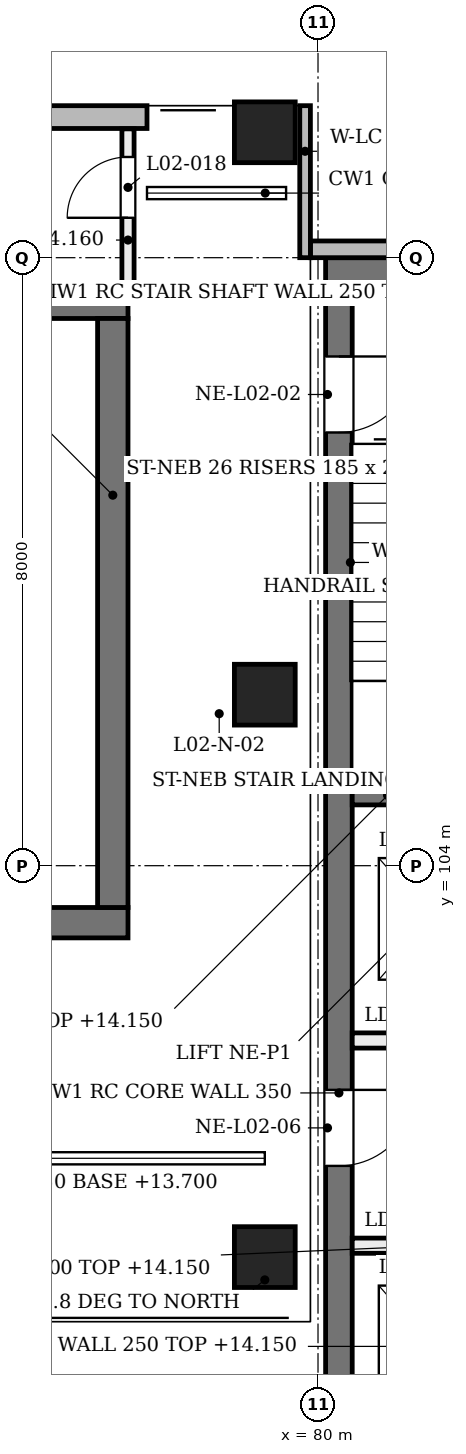
"""IFC4 building model, lengths in metres.
Left out: names, types, materials, properties, quantities, classifications, styles, units other than length and angle.
Written with IfcOpenShell. Run it as: python <this file> out.ifc"""

import sys

from ifc_helpers import new_model, si_unit, direction, frame, frame_2d, origin, origin_2d, place, context, subcontext, project, spatial, rectangle, extrude, element, fill, save


model = new_model("IFC4")
c1 = context("Model", 3, precision=1e-05, world=origin(), true_north=direction((0.0, 1.0)))
c2 = subcontext(c1, "Body", "Model", "MODEL_VIEW")
j1 = project(units=[si_unit("LENGTHUNIT", "METRE"), si_unit("PLANEANGLEUNIT", "RADIAN")], contexts=[c1])
p1 = place(None, origin())
s1 = spatial("IfcSite", under=j1, at=p1, CompositionType="ELEMENT")
p2 = place(p1, origin())
s2 = spatial("IfcBuilding", under=s1, at=p2, CompositionType="ELEMENT")
p3 = place(p2, frame((0.0, 0.0, 9.6)))
s3 = spatial("IfcBuildingStorey", under=s2, at=p3, CompositionType="ELEMENT", Elevation=9.6)
p4 = place(p3, frame((68.0, 103.25, 0.0), z_axis=(0.0, 0.0, 1.0), x_axis=(1.0, 0.0, 0.0)))
e1 = element("IfcWall", 1, at=p4, inside=s3, PredefinedType="SHEAR", context=c2, shape_type="SweptSolid", body=[
    extrude(rectangle(XDim=9.5, YDim=0.4, at=frame_2d((4.75, 0.0))), origin(), (0.0, 0.0, 1.0), 4.58),
])
p5 = place(p4, frame((1.25, 0.0, 0.0)))
e2 = element("IfcOpeningElement", 2, at=p5, cuts=e1, PredefinedType="OPENING", context=c2, shape_type="SweptSolid", body=[
    extrude(rectangle(XDim=1.05, YDim=2.2, at=frame_2d((0.525, 1.1))), frame((0.0, 0.21, 0.0), z_axis=(0.0, -1.0, 0.0), x_axis=(1.0, 0.0, 0.0)), (0.0, 0.0, 1.0), 0.42),
])
p6 = place(p4, frame((4.15, 0.0, 0.0)))
e3 = element("IfcOpeningElement", 3, at=p6, cuts=e1, PredefinedType="OPENING", context=c2, shape_type="SweptSolid", body=[
    extrude(rectangle(XDim=1.05, YDim=2.2, at=frame_2d((0.525, 1.1))), frame((0.0, 0.21, 0.0), z_axis=(0.0, -1.0, 0.0), x_axis=(1.0, 0.0, 0.0)), (0.0, 0.0, 1.0), 0.42),
])
p7 = place(p4, frame((7.05, 0.0, 0.0)))
e4 = element("IfcOpeningElement", 4, at=p7, cuts=e1, PredefinedType="OPENING", context=c2, shape_type="SweptSolid", body=[
    extrude(rectangle(XDim=1.05, YDim=2.2, at=frame_2d((0.525, 1.1))), frame((0.0, 0.21, 0.0), z_axis=(0.0, -1.0, 0.0), x_axis=(1.0, 0.0, 0.0)), (0.0, 0.0, 1.0), 0.42),
])
p8 = place(p3, frame((68.0, 111.4, 0.0), z_axis=(0.0, 0.0, 1.0), x_axis=(1.0, 0.0, 0.0)))
e5 = element("IfcWall", 5, at=p8, inside=s3, PredefinedType="SHEAR", context=c2, shape_type="SweptSolid", body=[
    extrude(rectangle(XDim=9.5, YDim=0.4, at=frame_2d((4.75, 0.0))), origin(), (0.0, 0.0, 1.0), 4.58),
])
p9 = place(p3, frame((77.3, 103.45, 0.0), z_axis=(0.0, 0.0, 1.0), x_axis=(0.0, 1.0, 0.0)))
e6 = element("IfcWall", 6, at=p9, inside=s3, PredefinedType="SHEAR", context=c2, shape_type="SweptSolid", body=[
    extrude(rectangle(XDim=7.75, YDim=0.4, at=frame_2d((3.875, 0.0))), origin(), (0.0, 0.0, 1.0), 4.58),
])
p10 = place(p3, frame((80.1, 111.825, 0.0), z_axis=(0.0, 0.0, 1.0), x_axis=(1.0, 0.0, 0.0)))
e7 = element("IfcWall", 7, at=p10, inside=s3, PredefinedType="SHEAR", context=c2, shape_type="SweptSolid", body=[
    extrude(rectangle(XDim=7.9, YDim=0.35, at=frame_2d((3.95, 0.0))), origin(), (0.0, 0.0, 1.0), 4.58),
])
p11 = place(p3, frame((80.275, 96.45, 0.0), z_axis=(0.0, 0.0, 1.0), x_axis=(0.0, 1.0, 0.0)))
e8 = element("IfcWall", 8, at=p11, inside=s3, PredefinedType="SHEAR", context=c2, shape_type="SweptSolid", body=[
    extrude(rectangle(XDim=15.2, YDim=0.35, at=frame_2d((7.6, 0.0))), origin(), (0.0, 0.0, 1.0), 4.58),
])
p12 = place(p11, frame((13.25, 0.0, 0.0)))
e9 = element("IfcOpeningElement", 9, at=p12, cuts=e8, PredefinedType="OPENING", context=c2, shape_type="SweptSolid", body=[
    extrude(rectangle(XDim=1.0, YDim=2.1, at=frame_2d((0.5, 1.05))), frame((0.0, 0.185, 0.0), z_axis=(0.0, -1.0, 0.0), x_axis=(1.0, 0.0, 0.0)), (0.0, 0.0, 1.0), 0.37),
])
p13 = place(p11, frame((3.6, 0.0, 0.0)))
e10 = element("IfcOpeningElement", 10, at=p13, cuts=e8, PredefinedType="OPENING", context=c2, shape_type="SweptSolid", body=[
    extrude(rectangle(XDim=1.0, YDim=2.1, at=frame_2d((0.5, 1.05))), frame((0.0, 0.185, 0.0), z_axis=(0.0, -1.0, 0.0), x_axis=(1.0, 0.0, 0.0)), (0.0, 0.0, 1.0), 0.37),
])
for number, where, z_axis, x_axis in (
    (11, (79.3, 98.6, 0.0), (0.0, 0.204, 0.979), (-1.0, 0.0, 0.0)),
    (12, (79.3, 106.0, 0.0), (0.0, 0.204, 0.979), (-1.0, 0.0, 0.0)),
    (13, (79.3, 113.4, 0.0), (0.0, 0.204, 0.979), (-1.0, 0.0, 0.0)),
):
    element("IfcColumn", number, at=place(p3, frame(where, z_axis=z_axis, x_axis=x_axis)), inside=s3, PredefinedType="COLUMN", context=c2, shape_type="SweptSolid", body=[
        extrude(rectangle(XDim=0.8, YDim=0.8, at=origin_2d()), origin(), (0.0, 0.0, 1.0), 4.903),
    ])
p14 = place(p3, frame((26.25, 113.85, 0.0), z_axis=(0.0, 0.0, 1.0), x_axis=(1.0, 0.0, 0.0)))
e14 = element("IfcWall", 14, at=p14, inside=s3, PredefinedType="SOLIDWALL", context=c2, shape_type="SweptSolid", body=[
    extrude(rectangle(XDim=51.5, YDim=0.3, at=frame_2d((25.75, 0.0))), origin(), (0.0, 0.0, 1.0), 3.9),
])
p15 = place(p3, frame((72.2, 100.15, 4.1), z_axis=(0.0, 0.0, 1.0), x_axis=(1.0, 0.0, 0.0)))
e15 = element("IfcWall", 15, at=p15, inside=s3, PredefinedType="SOLIDWALL", context=c2, shape_type="SweptSolid", body=[
    extrude(rectangle(XDim=6.9, YDim=0.15, at=frame_2d((3.45, 0.0))), origin(), (0.0, 0.0, 1.0), 0.48),
])
p16 = place(p3, frame((79.9, 112.11, 0.0), z_axis=(0.0, 0.0, 1.0), x_axis=(1.0, 0.0, 0.0)))
e16 = element("IfcWall", 16, at=p16, inside=s3, PredefinedType="SOLIDWALL", context=c2, shape_type="SweptSolid", body=[
    extrude(rectangle(XDim=8.2, YDim=0.22, at=frame_2d((4.1, 0.0))), origin(), (0.0, 0.0, 1.0), 3.9),
])
p17 = place(p16, frame((1.308, 0.0, 0.9)))
e17 = element("IfcOpeningElement", 17, at=p17, cuts=e16, PredefinedType="OPENING", context=c2, shape_type="SweptSolid", body=[
    extrude(rectangle(XDim=0.45, YDim=2.6, at=frame_2d((0.225, 1.3))), frame((0.0, 0.12, 0.0), z_axis=(0.0, -1.0, 0.0), x_axis=(1.0, 0.0, 0.0)), (0.0, 0.0, 1.0), 0.24),
])
p18 = place(p16, frame((3.975, 0.0, 0.9)))
e18 = element("IfcOpeningElement", 18, at=p18, cuts=e16, PredefinedType="OPENING", context=c2, shape_type="SweptSolid", body=[
    extrude(rectangle(XDim=0.45, YDim=2.6, at=frame_2d((0.225, 1.3))), frame((0.0, 0.12, 0.0), z_axis=(0.0, -1.0, 0.0), x_axis=(1.0, 0.0, 0.0)), (0.0, 0.0, 1.0), 0.24),
])
p19 = place(p16, frame((6.642, 0.0, 0.9)))
e19 = element("IfcOpeningElement", 19, at=p19, cuts=e16, PredefinedType="OPENING", context=c2, shape_type="SweptSolid", body=[
    extrude(rectangle(XDim=0.45, YDim=2.6, at=frame_2d((0.225, 1.3))), frame((0.0, 0.12, 0.0), z_axis=(0.0, -1.0, 0.0), x_axis=(1.0, 0.0, 0.0)), (0.0, 0.0, 1.0), 0.24),
])
p20 = place(p3, frame((79.83, 112.0, 0.0), z_axis=(0.0, 0.0, 1.0), x_axis=(0.0, 1.0, 0.0)))
e20 = element("IfcWall", 20, at=p20, inside=s3, PredefinedType="SOLIDWALL", context=c2, shape_type="SweptSolid", body=[
    extrude(rectangle(XDim=2.0, YDim=0.14, at=frame_2d((1.0, 0.0))), origin(), (0.0, 0.0, 1.0), 3.9),
])
p21 = place(p3, frame((83.55, 104.925, 0.0), z_axis=(0.0, 0.0, 1.0), x_axis=(-1.0, 0.0, 0.0)))
e21 = element("IfcWall", 21, at=p21, inside=s3, PredefinedType="SOLIDWALL", context=c2, shape_type="SweptSolid", body=[
    extrude(rectangle(XDim=3.1, YDim=0.25, at=frame_2d((1.55, 0.0))), origin(), (0.0, 0.0, 1.0), 4.55),
])
p22 = place(p3, frame((87.65, 101.7, 0.0), z_axis=(0.0, 0.0, 1.0), x_axis=(-1.0, 0.0, 0.0)))
e22 = element("IfcWall", 22, at=p22, inside=s3, PredefinedType="SOLIDWALL", context=c2, shape_type="SweptSolid", body=[
    extrude(rectangle(XDim=7.2, YDim=0.2, at=frame_2d((3.6, 0.0))), origin(), (0.0, 0.0, 1.0), 4.55),
])
p23 = place(p22, frame((0.5, 0.0, 0.0)))
e23 = element("IfcOpeningElement", 23, at=p23, cuts=e22, PredefinedType="OPENING", context=c2, shape_type="SweptSolid", body=[
    extrude(rectangle(XDim=1.1, YDim=2.1, at=frame_2d((0.55, 1.05))), frame((0.0, 0.11, 0.0), z_axis=(0.0, -1.0, 0.0), x_axis=(1.0, 0.0, 0.0)), (0.0, 0.0, 1.0), 0.22),
])
p24 = place(p22, frame((5.6, 0.0, 0.0)))
e24 = element("IfcOpeningElement", 24, at=p24, cuts=e22, PredefinedType="OPENING", context=c2, shape_type="SweptSolid", body=[
    extrude(rectangle(XDim=1.1, YDim=2.1, at=frame_2d((0.55, 1.05))), frame((0.0, 0.11, 0.0), z_axis=(0.0, -1.0, 0.0), x_axis=(1.0, 0.0, 0.0)), (0.0, 0.0, 1.0), 0.22),
])
p25 = place(p22, frame((3.1, 0.0, 0.0)))
e25 = element("IfcOpeningElement", 25, at=p25, cuts=e22, PredefinedType="OPENING", context=c2, shape_type="SweptSolid", body=[
    extrude(rectangle(XDim=1.0, YDim=2.1, at=frame_2d((0.5, 1.05))), frame((0.0, 0.11, 0.0), z_axis=(0.0, -1.0, 0.0), x_axis=(1.0, 0.0, 0.0)), (0.0, 0.0, 1.0), 0.22),
])
p26 = place(p3, frame((87.65, 99.0, 0.0), z_axis=(0.0, 0.0, 1.0), x_axis=(-1.0, 0.0, 0.0)))
e26 = element("IfcWall", 26, at=p26, inside=s3, PredefinedType="SOLIDWALL", context=c2, shape_type="SweptSolid", body=[
    extrude(rectangle(XDim=7.2, YDim=0.2, at=frame_2d((3.6, 0.0))), origin(), (0.0, 0.0, 1.0), 4.55),
])
p27 = place(p26, frame((0.5, 0.0, 0.0)))
e27 = element("IfcOpeningElement", 27, at=p27, cuts=e26, PredefinedType="OPENING", context=c2, shape_type="SweptSolid", body=[
    extrude(rectangle(XDim=1.1, YDim=2.1, at=frame_2d((0.55, 1.05))), frame((0.0, 0.11, 0.0), z_axis=(0.0, -1.0, 0.0), x_axis=(1.0, 0.0, 0.0)), (0.0, 0.0, 1.0), 0.22),
])
p28 = place(p26, frame((5.6, 0.0, 0.0)))
e28 = element("IfcOpeningElement", 28, at=p28, cuts=e26, PredefinedType="OPENING", context=c2, shape_type="SweptSolid", body=[
    extrude(rectangle(XDim=1.1, YDim=2.1, at=frame_2d((0.55, 1.05))), frame((0.0, 0.11, 0.0), z_axis=(0.0, -1.0, 0.0), x_axis=(1.0, 0.0, 0.0)), (0.0, 0.0, 1.0), 0.22),
])
p29 = place(p26, frame((3.1, 0.0, 0.0)))
e29 = element("IfcOpeningElement", 29, at=p29, cuts=e26, PredefinedType="OPENING", context=c2, shape_type="SweptSolid", body=[
    extrude(rectangle(XDim=1.0, YDim=2.1, at=frame_2d((0.5, 1.05))), frame((0.0, 0.11, 0.0), z_axis=(0.0, -1.0, 0.0), x_axis=(1.0, 0.0, 0.0)), (0.0, 0.0, 1.0), 0.22),
])
p30 = place(p3, frame((77.5, 111.605, 0.0), z_axis=(0.0, 0.0, 1.0), x_axis=(0.0, 1.0, 0.0)))
e30 = element("IfcWall", 30, at=p30, inside=s3, PredefinedType="PARTITIONING", context=c2, shape_type="SweptSolid", body=[
    extrude(rectangle(XDim=2.09, YDim=0.16, at=frame_2d((1.045, 0.0))), origin(), (0.0, 0.0, 1.0), 4.56),
])
p31 = place(p30, frame((0.92, 0.0, 0.0)))
e31 = element("IfcOpeningElement", 31, at=p31, cuts=e30, PredefinedType="OPENING", context=c2, shape_type="SweptSolid", body=[
    extrude(rectangle(XDim=0.8, YDim=2.1, at=frame_2d((0.4, 1.05))), frame((0.0, 0.09, 0.0), z_axis=(0.0, -1.0, 0.0), x_axis=(1.0, 0.0, 0.0)), (0.0, 0.0, 1.0), 0.18),
])
p32 = place(p12, origin())
e32 = element("IfcDoor", 32, at=p32, inside=s3, OperationType="SINGLE_SWING_RIGHT", PredefinedType="DOOR", context=c2, shape_type="SweptSolid", body=[
    extrude(rectangle(XDim=1.0, YDim=2.1, at=frame_2d((0.5, 1.05))), frame((0.0, 0.025, 0.0), z_axis=(0.0, -1.0, 0.0), x_axis=(1.0, 0.0, 0.0)), (0.0, 0.0, 1.0), 0.05),
])
fill(e9, e32)
p33 = place(p13, origin())
e33 = element("IfcDoor", 33, at=p33, inside=s3, OperationType="SINGLE_SWING_RIGHT", PredefinedType="DOOR", context=c2, shape_type="SweptSolid", body=[
    extrude(rectangle(XDim=1.0, YDim=2.1, at=frame_2d((0.5, 1.05))), frame((0.0, 0.025, 0.0), z_axis=(0.0, -1.0, 0.0), x_axis=(1.0, 0.0, 0.0)), (0.0, 0.0, 1.0), 0.05),
])
fill(e10, e33)
p34 = place(p31, origin())
e34 = element("IfcDoor", 34, at=p34, inside=s3, OperationType="SINGLE_SWING_LEFT", PredefinedType="DOOR", context=c2, shape_type="SweptSolid", body=[
    extrude(rectangle(XDim=0.8, YDim=2.1, at=frame_2d((0.4, 1.05))), frame((0.0, 0.025, 0.0), z_axis=(0.0, -1.0, 0.0), x_axis=(1.0, 0.0, 0.0)), (0.0, 0.0, 1.0), 0.05),
])
fill(e31, e34)
save(model, sys.argv[1])
